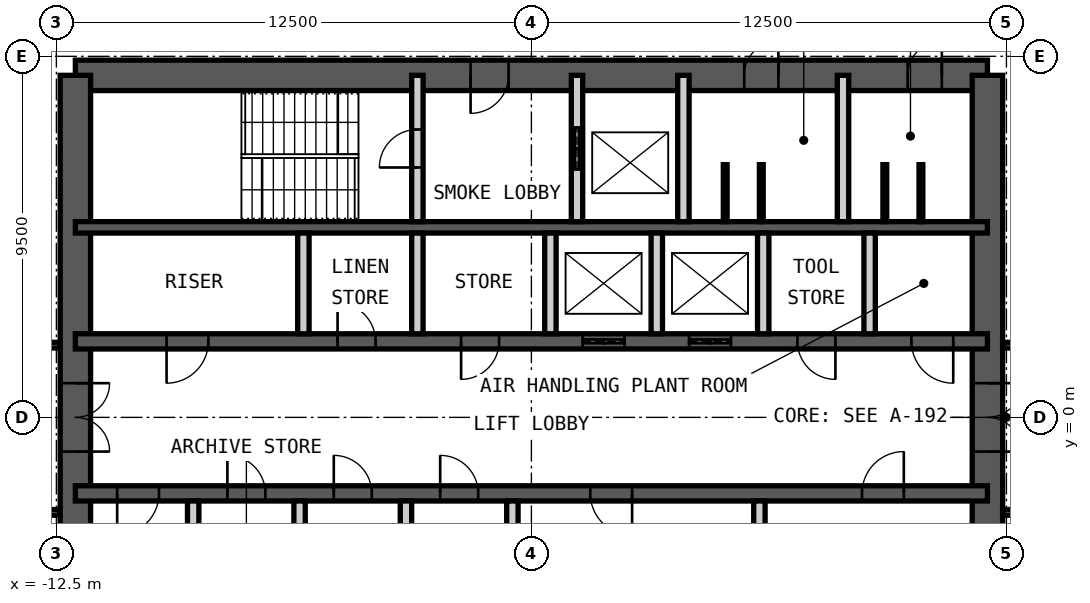
"""IFC4 building model, lengths in metres.
Left out: names, types, materials, properties, quantities, classifications, styles, units other than length and angle.
Written with IfcOpenShell. Run it as: python <this file> out.ifc"""

import sys

from ifc_helpers import new_model, si_unit, direction, frame, frame_2d, origin, place, context, subcontext, project, spatial, rectangle, extrude, element, fill, save


model = new_model("IFC4")
c1 = context("Model", 3, precision=1e-05, world=origin(), true_north=direction((0.0, 1.0)))
c2 = subcontext(c1, "Body", "Model", "MODEL_VIEW")
j1 = project(units=[si_unit("LENGTHUNIT", "METRE"), si_unit("PLANEANGLEUNIT", "RADIAN")], contexts=[c1])
p1 = place(None, origin())
s1 = spatial("IfcSite", under=j1, at=p1, CompositionType="ELEMENT")
p2 = place(p1, origin())
s2 = spatial("IfcBuilding", under=s1, at=p2, CompositionType="ELEMENT")
p3 = place(p2, frame((0.0, 0.0, 316.6)))
s3 = spatial("IfcBuildingStorey", under=s2, at=p3, CompositionType="ELEMENT", Elevation=316.6)
p4 = place(p3, frame((-12.0, 9.0, 0.0), z_axis=(0.0, 0.0, 1.0), x_axis=(1.0, 0.0, 0.0)))
e1 = element("IfcWall", 1, at=p4, inside=s3, PredefinedType="SHEAR", context=c2, shape_type="SweptSolid", body=[
    extrude(rectangle(XDim=24.0, YDim=0.8, at=frame_2d((12.0, 0.0))), origin(), (0.0, 0.0, 1.0), 4.2),
])
p5 = place(p4, frame((10.4, 0.0, 0.0)))
e2 = element("IfcOpeningElement", 2, at=p5, cuts=e1, PredefinedType="OPENING", context=c2, shape_type="SweptSolid", body=[
    extrude(rectangle(XDim=1.0, YDim=2.1, at=frame_2d((0.5, 1.05))), frame((0.0, 0.41, 0.0), z_axis=(0.0, -1.0, 0.0), x_axis=(1.0, 0.0, 0.0)), (0.0, 0.0, 1.0), 0.82),
])
p6 = place(p4, frame((17.6, 0.0, 0.0)))
e3 = element("IfcOpeningElement", 3, at=p6, cuts=e1, PredefinedType="OPENING", context=c2, shape_type="SweptSolid", body=[
    extrude(rectangle(XDim=0.9, YDim=2.1, at=frame_2d((0.45, 1.05))), frame((0.0, 0.41, 0.0), z_axis=(0.0, -1.0, 0.0), x_axis=(1.0, 0.0, 0.0)), (0.0, 0.0, 1.0), 0.82),
])
p7 = place(p4, frame((21.9, 0.0, 0.0)))
e4 = element("IfcOpeningElement", 4, at=p7, cuts=e1, PredefinedType="OPENING", context=c2, shape_type="SweptSolid", body=[
    extrude(rectangle(XDim=0.9, YDim=2.1, at=frame_2d((0.45, 1.05))), frame((0.0, 0.41, 0.0), z_axis=(0.0, -1.0, 0.0), x_axis=(1.0, 0.0, 0.0)), (0.0, 0.0, 1.0), 0.82),
])
p8 = place(p3, frame((12.0, -9.0, 0.0), z_axis=(0.0, 0.0, 1.0), x_axis=(0.0, 1.0, 0.0)))
e5 = element("IfcWall", 5, at=p8, inside=s3, PredefinedType="SHEAR", context=c2, shape_type="SweptSolid", body=[
    extrude(rectangle(XDim=18.0, YDim=0.8, at=frame_2d((9.0, 0.0))), origin(), (0.0, 0.0, 1.0), 4.2),
])
p9 = place(p8, frame((8.1, 0.0, 0.0)))
e6 = element("IfcOpeningElement", 6, at=p9, cuts=e5, PredefinedType="OPENING", context=c2, shape_type="SweptSolid", body=[
    extrude(rectangle(XDim=1.8, YDim=2.1, at=frame_2d((0.9, 1.05))), frame((0.0, 0.41, 0.0), z_axis=(0.0, -1.0, 0.0), x_axis=(1.0, 0.0, 0.0)), (0.0, 0.0, 1.0), 0.82),
])
p10 = place(p3, frame((-12.0, -9.0, 0.0), z_axis=(0.0, 0.0, 1.0), x_axis=(0.0, 1.0, 0.0)))
e7 = element("IfcWall", 7, at=p10, inside=s3, PredefinedType="SHEAR", context=c2, shape_type="SweptSolid", body=[
    extrude(rectangle(XDim=18.0, YDim=0.8, at=frame_2d((9.0, 0.0))), origin(), (0.0, 0.0, 1.0), 4.2),
])
p11 = place(p10, frame((8.1, 0.0, 0.0)))
e8 = element("IfcOpeningElement", 8, at=p11, cuts=e7, PredefinedType="OPENING", context=c2, shape_type="SweptSolid", body=[
    extrude(rectangle(XDim=1.8, YDim=2.1, at=frame_2d((0.9, 1.05))), frame((0.0, 0.41, 0.0), z_axis=(0.0, -1.0, 0.0), x_axis=(1.0, 0.0, 0.0)), (0.0, 0.0, 1.0), 0.82),
])
p12 = place(p3, frame((-12.0, 5.0, 0.0), z_axis=(0.0, 0.0, 1.0), x_axis=(1.0, 0.0, 0.0)))
e9 = element("IfcWall", 9, at=p12, inside=s3, PredefinedType="SHEAR", context=c2, shape_type="SweptSolid", body=[
    extrude(rectangle(XDim=24.0, YDim=0.3, at=frame_2d((12.0, 0.0))), origin(), (0.0, 0.0, 1.0), 4.2),
])
p13 = place(p3, frame((-12.0, 2.0, 0.0), z_axis=(0.0, 0.0, 1.0), x_axis=(1.0, 0.0, 0.0)))
e10 = element("IfcWall", 10, at=p13, inside=s3, PredefinedType="SHEAR", context=c2, shape_type="SweptSolid", body=[
    extrude(rectangle(XDim=24.0, YDim=0.4, at=frame_2d((12.0, 0.0))), origin(), (0.0, 0.0, 1.0), 4.2),
])
p14 = place(p13, frame((2.4, 0.0, 0.0)))
e11 = element("IfcOpeningElement", 11, at=p14, cuts=e10, PredefinedType="OPENING", context=c2, shape_type="SweptSolid", body=[
    extrude(rectangle(XDim=1.1, YDim=2.1, at=frame_2d((0.55, 1.05))), frame((0.0, 0.21, 0.0), z_axis=(0.0, -1.0, 0.0), x_axis=(1.0, 0.0, 0.0)), (0.0, 0.0, 1.0), 0.42),
])
p15 = place(p13, frame((22.0, 0.0, 0.0)))
e12 = element("IfcOpeningElement", 12, at=p15, cuts=e10, PredefinedType="OPENING", context=c2, shape_type="SweptSolid", body=[
    extrude(rectangle(XDim=1.1, YDim=2.1, at=frame_2d((0.55, 1.05))), frame((0.0, 0.21, 0.0), z_axis=(0.0, -1.0, 0.0), x_axis=(1.0, 0.0, 0.0)), (0.0, 0.0, 1.0), 0.42),
])
p16 = place(p13, frame((10.15, 0.0, 0.0)))
e13 = element("IfcOpeningElement", 13, at=p16, cuts=e10, PredefinedType="OPENING", context=c2, shape_type="SweptSolid", body=[
    extrude(rectangle(XDim=1.0, YDim=2.1, at=frame_2d((0.5, 1.05))), frame((0.0, 0.21, 0.0), z_axis=(0.0, -1.0, 0.0), x_axis=(1.0, 0.0, 0.0)), (0.0, 0.0, 1.0), 0.42),
])
p17 = place(p13, frame((6.9, 0.0, 0.0)))
e14 = element("IfcOpeningElement", 14, at=p17, cuts=e10, PredefinedType="OPENING", context=c2, shape_type="SweptSolid", body=[
    extrude(rectangle(XDim=1.0, YDim=2.1, at=frame_2d((0.5, 1.05))), frame((0.0, 0.21, 0.0), z_axis=(0.0, -1.0, 0.0), x_axis=(1.0, 0.0, 0.0)), (0.0, 0.0, 1.0), 0.42),
])
p18 = place(p13, frame((13.35, 0.0, 0.0)))
e15 = element("IfcOpeningElement", 15, at=p18, cuts=e10, PredefinedType="OPENING", context=c2, shape_type="SweptSolid", body=[
    extrude(rectangle(XDim=1.1, YDim=2.4, at=frame_2d((0.55, 1.2))), frame((0.0, 0.21, 0.0), z_axis=(0.0, -1.0, 0.0), x_axis=(1.0, 0.0, 0.0)), (0.0, 0.0, 1.0), 0.42),
])
p19 = place(p13, frame((16.15, 0.0, 0.0)))
e16 = element("IfcOpeningElement", 16, at=p19, cuts=e10, PredefinedType="OPENING", context=c2, shape_type="SweptSolid", body=[
    extrude(rectangle(XDim=1.1, YDim=2.4, at=frame_2d((0.55, 1.2))), frame((0.0, 0.21, 0.0), z_axis=(0.0, -1.0, 0.0), x_axis=(1.0, 0.0, 0.0)), (0.0, 0.0, 1.0), 0.42),
])
p20 = place(p13, frame((19.0, 0.0, 0.0)))
e17 = element("IfcOpeningElement", 17, at=p20, cuts=e10, PredefinedType="OPENING", context=c2, shape_type="SweptSolid", body=[
    extrude(rectangle(XDim=1.0, YDim=2.1, at=frame_2d((0.5, 1.05))), frame((0.0, 0.21, 0.0), z_axis=(0.0, -1.0, 0.0), x_axis=(1.0, 0.0, 0.0)), (0.0, 0.0, 1.0), 0.42),
])
p21 = place(p3, frame((-12.0, -2.0, 0.0), z_axis=(0.0, 0.0, 1.0), x_axis=(1.0, 0.0, 0.0)))
e18 = element("IfcWall", 18, at=p21, inside=s3, PredefinedType="SHEAR", context=c2, shape_type="SweptSolid", body=[
    extrude(rectangle(XDim=24.0, YDim=0.4, at=frame_2d((12.0, 0.0))), origin(), (0.0, 0.0, 1.0), 4.2),
])
p22 = place(p21, frame((1.1, 0.0, 0.0)))
e19 = element("IfcOpeningElement", 19, at=p22, cuts=e18, PredefinedType="OPENING", context=c2, shape_type="SweptSolid", body=[
    extrude(rectangle(XDim=1.1, YDim=2.1, at=frame_2d((0.55, 1.05))), frame((0.0, 0.21, 0.0), z_axis=(0.0, -1.0, 0.0), x_axis=(1.0, 0.0, 0.0)), (0.0, 0.0, 1.0), 0.42),
])
p23 = place(p21, frame((13.55, 0.0, 0.0)))
e20 = element("IfcOpeningElement", 20, at=p23, cuts=e18, PredefinedType="OPENING", context=c2, shape_type="SweptSolid", body=[
    extrude(rectangle(XDim=1.1, YDim=2.1, at=frame_2d((0.55, 1.05))), frame((0.0, 0.21, 0.0), z_axis=(0.0, -1.0, 0.0), x_axis=(1.0, 0.0, 0.0)), (0.0, 0.0, 1.0), 0.42),
])
p24 = place(p21, frame((20.7, 0.0, 0.0)))
e21 = element("IfcOpeningElement", 21, at=p24, cuts=e18, PredefinedType="OPENING", context=c2, shape_type="SweptSolid", body=[
    extrude(rectangle(XDim=1.1, YDim=2.1, at=frame_2d((0.55, 1.05))), frame((0.0, 0.21, 0.0), z_axis=(0.0, -1.0, 0.0), x_axis=(1.0, 0.0, 0.0)), (0.0, 0.0, 1.0), 0.42),
])
p25 = place(p21, frame((4.0, 0.0, 0.0)))
e22 = element("IfcOpeningElement", 22, at=p25, cuts=e18, PredefinedType="OPENING", context=c2, shape_type="SweptSolid", body=[
    extrude(rectangle(XDim=1.0, YDim=2.1, at=frame_2d((0.5, 1.05))), frame((0.0, 0.21, 0.0), z_axis=(0.0, -1.0, 0.0), x_axis=(1.0, 0.0, 0.0)), (0.0, 0.0, 1.0), 0.42),
])
p26 = place(p21, frame((6.8, 0.0, 0.0)))
e23 = element("IfcOpeningElement", 23, at=p26, cuts=e18, PredefinedType="OPENING", context=c2, shape_type="SweptSolid", body=[
    extrude(rectangle(XDim=1.0, YDim=2.1, at=frame_2d((0.5, 1.05))), frame((0.0, 0.21, 0.0), z_axis=(0.0, -1.0, 0.0), x_axis=(1.0, 0.0, 0.0)), (0.0, 0.0, 1.0), 0.42),
])
p27 = place(p21, frame((9.6, 0.0, 0.0)))
e24 = element("IfcOpeningElement", 24, at=p27, cuts=e18, PredefinedType="OPENING", context=c2, shape_type="SweptSolid", body=[
    extrude(rectangle(XDim=1.0, YDim=2.1, at=frame_2d((0.5, 1.05))), frame((0.0, 0.21, 0.0), z_axis=(0.0, -1.0, 0.0), x_axis=(1.0, 0.0, 0.0)), (0.0, 0.0, 1.0), 0.42),
])
p28 = place(p3, frame((-3.0, 5.15, 0.0), z_axis=(0.0, 0.0, 1.0), x_axis=(0.0, 1.0, 0.0)))
e25 = element("IfcWall", 25, at=p28, inside=s3, PredefinedType="PARTITIONING", context=c2, shape_type="SweptSolid", body=[
    extrude(rectangle(XDim=3.85, YDim=0.3, at=frame_2d((1.925, 0.0))), origin(), (0.0, 0.0, 1.0), 3.98),
])
p29 = place(p28, frame((1.425, 0.0, 0.0)))
e26 = element("IfcOpeningElement", 26, at=p29, cuts=e25, PredefinedType="OPENING", context=c2, shape_type="SweptSolid", body=[
    extrude(rectangle(XDim=1.0, YDim=2.1, at=frame_2d((0.5, 1.05))), frame((0.0, 0.16, 0.0), z_axis=(0.0, -1.0, 0.0), x_axis=(1.0, 0.0, 0.0)), (0.0, 0.0, 1.0), 0.32),
])
p30 = place(p3, frame((1.2, 5.15, 0.0), z_axis=(0.0, 0.0, 1.0), x_axis=(0.0, 1.0, 0.0)))
e27 = element("IfcWall", 27, at=p30, inside=s3, PredefinedType="PARTITIONING", context=c2, shape_type="SweptSolid", body=[
    extrude(rectangle(XDim=3.85, YDim=0.3, at=frame_2d((1.925, 0.0))), origin(), (0.0, 0.0, 1.0), 3.98),
])
p31 = place(p30, frame((1.375, 0.0, 0.0)))
e28 = element("IfcOpeningElement", 28, at=p31, cuts=e27, PredefinedType="OPENING", context=c2, shape_type="SweptSolid", body=[
    extrude(rectangle(XDim=1.1, YDim=2.4, at=frame_2d((0.55, 1.2))), frame((0.0, 0.16, 0.0), z_axis=(0.0, -1.0, 0.0), x_axis=(1.0, 0.0, 0.0)), (0.0, 0.0, 1.0), 0.32),
])
for number, where, z_axis, x_axis in (
    (29, (4.0, 5.15, 0.0), (0.0, 0.0, 1.0), (0.0, 1.0, 0.0)),
    (30, (8.2, 5.15, 0.0), (0.0, 0.0, 1.0), (0.0, 1.0, 0.0)),
):
    element("IfcWall", number, at=place(p3, frame(where, z_axis=z_axis, x_axis=x_axis)), inside=s3, PredefinedType="PARTITIONING", context=c2, shape_type="SweptSolid", body=[
        extrude(rectangle(XDim=3.85, YDim=0.3, at=frame_2d((1.925, 0.0))), origin(), (0.0, 0.0, 1.0), 3.98),
    ])
for number, where, z_axis, x_axis in (
    (31, (-6.0, 2.2, 0.0), (0.0, 0.0, 1.0), (0.0, 1.0, 0.0)),
    (32, (-3.0, 2.2, 0.0), (0.0, 0.0, 1.0), (0.0, 1.0, 0.0)),
    (33, (0.5, 2.2, 0.0), (0.0, 0.0, 1.0), (0.0, 1.0, 0.0)),
    (34, (3.3, 2.2, 0.0), (0.0, 0.0, 1.0), (0.0, 1.0, 0.0)),
    (35, (6.1, 2.2, 0.0), (0.0, 0.0, 1.0), (0.0, 1.0, 0.0)),
    (36, (8.9, 2.2, 0.0), (0.0, 0.0, 1.0), (0.0, 1.0, 0.0)),
    (37, (-8.9, -4.85, 0.0), (0.0, 0.0, 1.0), (0.0, 1.0, 0.0)),
    (38, (-6.1, -4.85, 0.0), (0.0, 0.0, 1.0), (0.0, 1.0, 0.0)),
    (39, (-3.3, -4.85, 0.0), (0.0, 0.0, 1.0), (0.0, 1.0, 0.0)),
    (40, (-0.5, -4.85, 0.0), (0.0, 0.0, 1.0), (0.0, 1.0, 0.0)),
    (41, (6.0, -4.85, 0.0), (0.0, 0.0, 1.0), (0.0, 1.0, 0.0)),
):
    element("IfcWall", number, at=place(p3, frame(where, z_axis=z_axis, x_axis=x_axis)), inside=s3, PredefinedType="PARTITIONING", context=c2, shape_type="SweptSolid", body=[
        extrude(rectangle(XDim=2.65, YDim=0.3, at=frame_2d((1.325, 0.0))), origin(), (0.0, 0.0, 1.0), 3.98),
    ])
for number, where, z_axis, x_axis in (
    (42, (5.1, 5.15, 0.0), (0.0, 0.0, 1.0), (0.0, 1.0, 0.0)),
    (43, (6.05, 5.15, 0.0), (0.0, 0.0, 1.0), (0.0, 1.0, 0.0)),
    (44, (9.3, 5.15, 0.0), (0.0, 0.0, 1.0), (0.0, 1.0, 0.0)),
    (45, (10.25, 5.15, 0.0), (0.0, 0.0, 1.0), (0.0, 1.0, 0.0)),
):
    element("IfcWall", number, at=place(p3, frame(where, z_axis=z_axis, x_axis=x_axis)), inside=s3, PredefinedType="PARTITIONING", context=c2, shape_type="SweptSolid", body=[
        extrude(rectangle(XDim=1.5, YDim=0.1, at=frame_2d((0.75, 0.0))), origin(), (0.0, 0.0, 1.0), 2.1),
    ])
p32 = place(p3, frame((12.4, 1.9, 0.0), z_axis=(0.0, 0.0, 1.0), x_axis=(1.0, 0.0, 0.0)))
e46 = element("IfcWall", 46, at=p32, inside=s3, PredefinedType="PARTITIONING", context=c2, shape_type="SweptSolid", body=[
    extrude(rectangle(XDim=2.2, YDim=0.15, at=frame_2d((1.1, 0.0))), origin(), (0.0, 0.0, 1.0), 2.93),
])
p33 = place(p3, frame((12.4, -2.5, 0.0), z_axis=(0.0, 0.0, 1.0), x_axis=(1.0, 0.0, 0.0)))
e47 = element("IfcWall", 47, at=p33, inside=s3, PredefinedType="PARTITIONING", context=c2, shape_type="SweptSolid", body=[
    extrude(rectangle(XDim=2.2, YDim=0.15, at=frame_2d((1.1, 0.0))), origin(), (0.0, 0.0, 1.0), 3.33),
])
for number, where, z_axis, x_axis in (
    (48, (-12.4, 1.9, 0.0), (0.0, 0.0, 1.0), (-1.0, 0.0, 0.0)),
    (49, (-12.4, -2.5, 0.0), (0.0, 0.0, 1.0), (-1.0, 0.0, 0.0)),
):
    element("IfcWall", number, at=place(p3, frame(where, z_axis=z_axis, x_axis=x_axis)), inside=s3, PredefinedType="PARTITIONING", context=c2, shape_type="SweptSolid", body=[
        extrude(rectangle(XDim=2.2, YDim=0.15, at=frame_2d((1.1, 0.0))), origin(), (0.0, 0.0, 1.0), 3.53),
    ])
p34 = place(p5, origin())
e50 = element("IfcDoor", 50, at=p34, inside=s3, OperationType="SINGLE_SWING_LEFT", PredefinedType="DOOR", context=c2, shape_type="SweptSolid", body=[
    extrude(rectangle(XDim=1.0, YDim=2.1, at=frame_2d((0.5, 1.05))), frame((0.0, 0.025, 0.0), z_axis=(0.0, -1.0, 0.0), x_axis=(1.0, 0.0, 0.0)), (0.0, 0.0, 1.0), 0.05),
])
fill(e2, e50)
p35 = place(p6, origin())
e51 = element("IfcDoor", 51, at=p35, inside=s3, OperationType="SINGLE_SWING_LEFT", PredefinedType="DOOR", context=c2, shape_type="SweptSolid", body=[
    extrude(rectangle(XDim=0.9, YDim=2.1, at=frame_2d((0.45, 1.05))), frame((0.0, 0.025, 0.0), z_axis=(0.0, -1.0, 0.0), x_axis=(1.0, 0.0, 0.0)), (0.0, 0.0, 1.0), 0.05),
])
fill(e3, e51)
p36 = place(p7, origin())
e52 = element("IfcDoor", 52, at=p36, inside=s3, OperationType="SINGLE_SWING_LEFT", PredefinedType="DOOR", context=c2, shape_type="SweptSolid", body=[
    extrude(rectangle(XDim=0.9, YDim=2.1, at=frame_2d((0.45, 1.05))), frame((0.0, 0.025, 0.0), z_axis=(0.0, -1.0, 0.0), x_axis=(1.0, 0.0, 0.0)), (0.0, 0.0, 1.0), 0.05),
])
fill(e4, e52)
p37 = place(p29, origin())
e53 = element("IfcDoor", 53, at=p37, inside=s3, OperationType="SINGLE_SWING_RIGHT", PredefinedType="DOOR", context=c2, shape_type="SweptSolid", body=[
    extrude(rectangle(XDim=1.0, YDim=2.1, at=frame_2d((0.5, 1.05))), frame((0.0, 0.025, 0.0), z_axis=(0.0, -1.0, 0.0), x_axis=(1.0, 0.0, 0.0)), (0.0, 0.0, 1.0), 0.05),
])
fill(e26, e53)
p38 = place(p14, origin())
e54 = element("IfcDoor", 54, at=p38, inside=s3, OperationType="SINGLE_SWING_LEFT", PredefinedType="DOOR", context=c2, shape_type="SweptSolid", body=[
    extrude(rectangle(XDim=1.1, YDim=2.1, at=frame_2d((0.55, 1.05))), frame((0.0, 0.025, 0.0), z_axis=(0.0, -1.0, 0.0), x_axis=(1.0, 0.0, 0.0)), (0.0, 0.0, 1.0), 0.05),
])
fill(e11, e54)
p39 = place(p22, origin())
e55 = element("IfcDoor", 55, at=p39, inside=s3, OperationType="SINGLE_SWING_LEFT", PredefinedType="DOOR", context=c2, shape_type="SweptSolid", body=[
    extrude(rectangle(XDim=1.1, YDim=2.1, at=frame_2d((0.55, 1.05))), frame((0.0, 0.025, 0.0), z_axis=(0.0, -1.0, 0.0), x_axis=(1.0, 0.0, 0.0)), (0.0, 0.0, 1.0), 0.05),
])
fill(e19, e55)
p40 = place(p15, origin())
e56 = element("IfcDoor", 56, at=p40, inside=s3, OperationType="SINGLE_SWING_RIGHT", PredefinedType="DOOR", context=c2, shape_type="SweptSolid", body=[
    extrude(rectangle(XDim=1.1, YDim=2.1, at=frame_2d((0.55, 1.05))), frame((0.0, 0.025, 0.0), z_axis=(0.0, -1.0, 0.0), x_axis=(1.0, 0.0, 0.0)), (0.0, 0.0, 1.0), 0.05),
])
fill(e12, e56)
p41 = place(p16, origin())
e57 = element("IfcDoor", 57, at=p41, inside=s3, OperationType="SINGLE_SWING_LEFT", PredefinedType="DOOR", context=c2, shape_type="SweptSolid", body=[
    extrude(rectangle(XDim=1.0, YDim=2.1, at=frame_2d((0.5, 1.05))), frame((0.0, 0.025, 0.0), z_axis=(0.0, -1.0, 0.0), x_axis=(1.0, 0.0, 0.0)), (0.0, 0.0, 1.0), 0.05),
])
fill(e13, e57)
p42 = place(p23, origin())
e58 = element("IfcDoor", 58, at=p42, inside=s3, OperationType="SINGLE_SWING_RIGHT", PredefinedType="DOOR", context=c2, shape_type="SweptSolid", body=[
    extrude(rectangle(XDim=1.1, YDim=2.1, at=frame_2d((0.55, 1.05))), frame((0.0, 0.025, 0.0), z_axis=(0.0, -1.0, 0.0), x_axis=(1.0, 0.0, 0.0)), (0.0, 0.0, 1.0), 0.05),
])
fill(e20, e58)
p43 = place(p24, origin())
e59 = element("IfcDoor", 59, at=p43, inside=s3, OperationType="SINGLE_SWING_LEFT", PredefinedType="DOOR", context=c2, shape_type="SweptSolid", body=[
    extrude(rectangle(XDim=1.1, YDim=2.1, at=frame_2d((0.55, 1.05))), frame((0.0, 0.025, 0.0), z_axis=(0.0, -1.0, 0.0), x_axis=(1.0, 0.0, 0.0)), (0.0, 0.0, 1.0), 0.05),
])
fill(e21, e59)
p44 = place(p9, origin())
e60 = element("IfcDoor", 60, at=p44, inside=s3, OperationType="DOUBLE_DOOR_DOUBLE_SWING", PredefinedType="DOOR", context=c2, shape_type="SweptSolid", body=[
    extrude(rectangle(XDim=1.8, YDim=2.1, at=frame_2d((0.9, 1.05))), frame((0.0, 0.025, 0.0), z_axis=(0.0, -1.0, 0.0), x_axis=(1.0, 0.0, 0.0)), (0.0, 0.0, 1.0), 0.05),
])
fill(e6, e60)
p45 = place(p11, origin())
e61 = element("IfcDoor", 61, at=p45, inside=s3, OperationType="DOUBLE_DOOR_DOUBLE_SWING", PredefinedType="DOOR", context=c2, shape_type="SweptSolid", body=[
    extrude(rectangle(XDim=1.8, YDim=2.1, at=frame_2d((0.9, 1.05))), frame((0.0, 0.025, 0.0), z_axis=(0.0, -1.0, 0.0), x_axis=(1.0, 0.0, 0.0)), (0.0, 0.0, 1.0), 0.05),
])
fill(e8, e61)
p46 = place(p31, origin())
e62 = element("IfcDoor", 62, at=p46, inside=s3, OperationType="DOUBLE_DOOR_SLIDING", PredefinedType="DOOR", context=c2, shape_type="SweptSolid", body=[
    extrude(rectangle(XDim=1.1, YDim=2.4, at=frame_2d((0.55, 1.2))), frame((0.0, 0.025, 0.0), z_axis=(0.0, -1.0, 0.0), x_axis=(1.0, 0.0, 0.0)), (0.0, 0.0, 1.0), 0.05),
])
fill(e28, e62)
p47 = place(p17, origin())
e63 = element("IfcDoor", 63, at=p47, inside=s3, OperationType="SINGLE_SWING_RIGHT", PredefinedType="DOOR", context=c2, shape_type="SweptSolid", body=[
    extrude(rectangle(XDim=1.0, YDim=2.1, at=frame_2d((0.5, 1.05))), frame((0.0, 0.025, 0.0), z_axis=(0.0, -1.0, 0.0), x_axis=(1.0, 0.0, 0.0)), (0.0, 0.0, 1.0), 0.05),
])
fill(e14, e63)
p48 = place(p18, origin())
e64 = element("IfcDoor", 64, at=p48, inside=s3, OperationType="DOUBLE_DOOR_SLIDING", PredefinedType="DOOR", context=c2, shape_type="SweptSolid", body=[
    extrude(rectangle(XDim=1.1, YDim=2.4, at=frame_2d((0.55, 1.2))), frame((0.0, 0.025, 0.0), z_axis=(0.0, -1.0, 0.0), x_axis=(1.0, 0.0, 0.0)), (0.0, 0.0, 1.0), 0.05),
])
fill(e15, e64)
p49 = place(p19, origin())
e65 = element("IfcDoor", 65, at=p49, inside=s3, OperationType="DOUBLE_DOOR_SLIDING", PredefinedType="DOOR", context=c2, shape_type="SweptSolid", body=[
    extrude(rectangle(XDim=1.1, YDim=2.4, at=frame_2d((0.55, 1.2))), frame((0.0, 0.025, 0.0), z_axis=(0.0, -1.0, 0.0), x_axis=(1.0, 0.0, 0.0)), (0.0, 0.0, 1.0), 0.05),
])
fill(e16, e65)
p50 = place(p20, origin())
e66 = element("IfcDoor", 66, at=p50, inside=s3, OperationType="SINGLE_SWING_RIGHT", PredefinedType="DOOR", context=c2, shape_type="SweptSolid", body=[
    extrude(rectangle(XDim=1.0, YDim=2.1, at=frame_2d((0.5, 1.05))), frame((0.0, 0.025, 0.0), z_axis=(0.0, -1.0, 0.0), x_axis=(1.0, 0.0, 0.0)), (0.0, 0.0, 1.0), 0.05),
])
fill(e17, e66)
p51 = place(p25, origin())
e67 = element("IfcDoor", 67, at=p51, inside=s3, OperationType="SINGLE_SWING_RIGHT", PredefinedType="DOOR", context=c2, shape_type="SweptSolid", body=[
    extrude(rectangle(XDim=1.0, YDim=2.1, at=frame_2d((0.5, 1.05))), frame((0.0, 0.025, 0.0), z_axis=(0.0, -1.0, 0.0), x_axis=(1.0, 0.0, 0.0)), (0.0, 0.0, 1.0), 0.05),
])
fill(e22, e67)
p52 = place(p26, origin())
e68 = element("IfcDoor", 68, at=p52, inside=s3, OperationType="SINGLE_SWING_RIGHT", PredefinedType="DOOR", context=c2, shape_type="SweptSolid", body=[
    extrude(rectangle(XDim=1.0, YDim=2.1, at=frame_2d((0.5, 1.05))), frame((0.0, 0.025, 0.0), z_axis=(0.0, -1.0, 0.0), x_axis=(1.0, 0.0, 0.0)), (0.0, 0.0, 1.0), 0.05),
])
fill(e23, e68)
p53 = place(p27, origin())
e69 = element("IfcDoor", 69, at=p53, inside=s3, OperationType="SINGLE_SWING_RIGHT", PredefinedType="DOOR", context=c2, shape_type="SweptSolid", body=[
    extrude(rectangle(XDim=1.0, YDim=2.1, at=frame_2d((0.5, 1.05))), frame((0.0, 0.025, 0.0), z_axis=(0.0, -1.0, 0.0), x_axis=(1.0, 0.0, 0.0)), (0.0, 0.0, 1.0), 0.05),
])
fill(e24, e69)
save(model, sys.argv[1])
